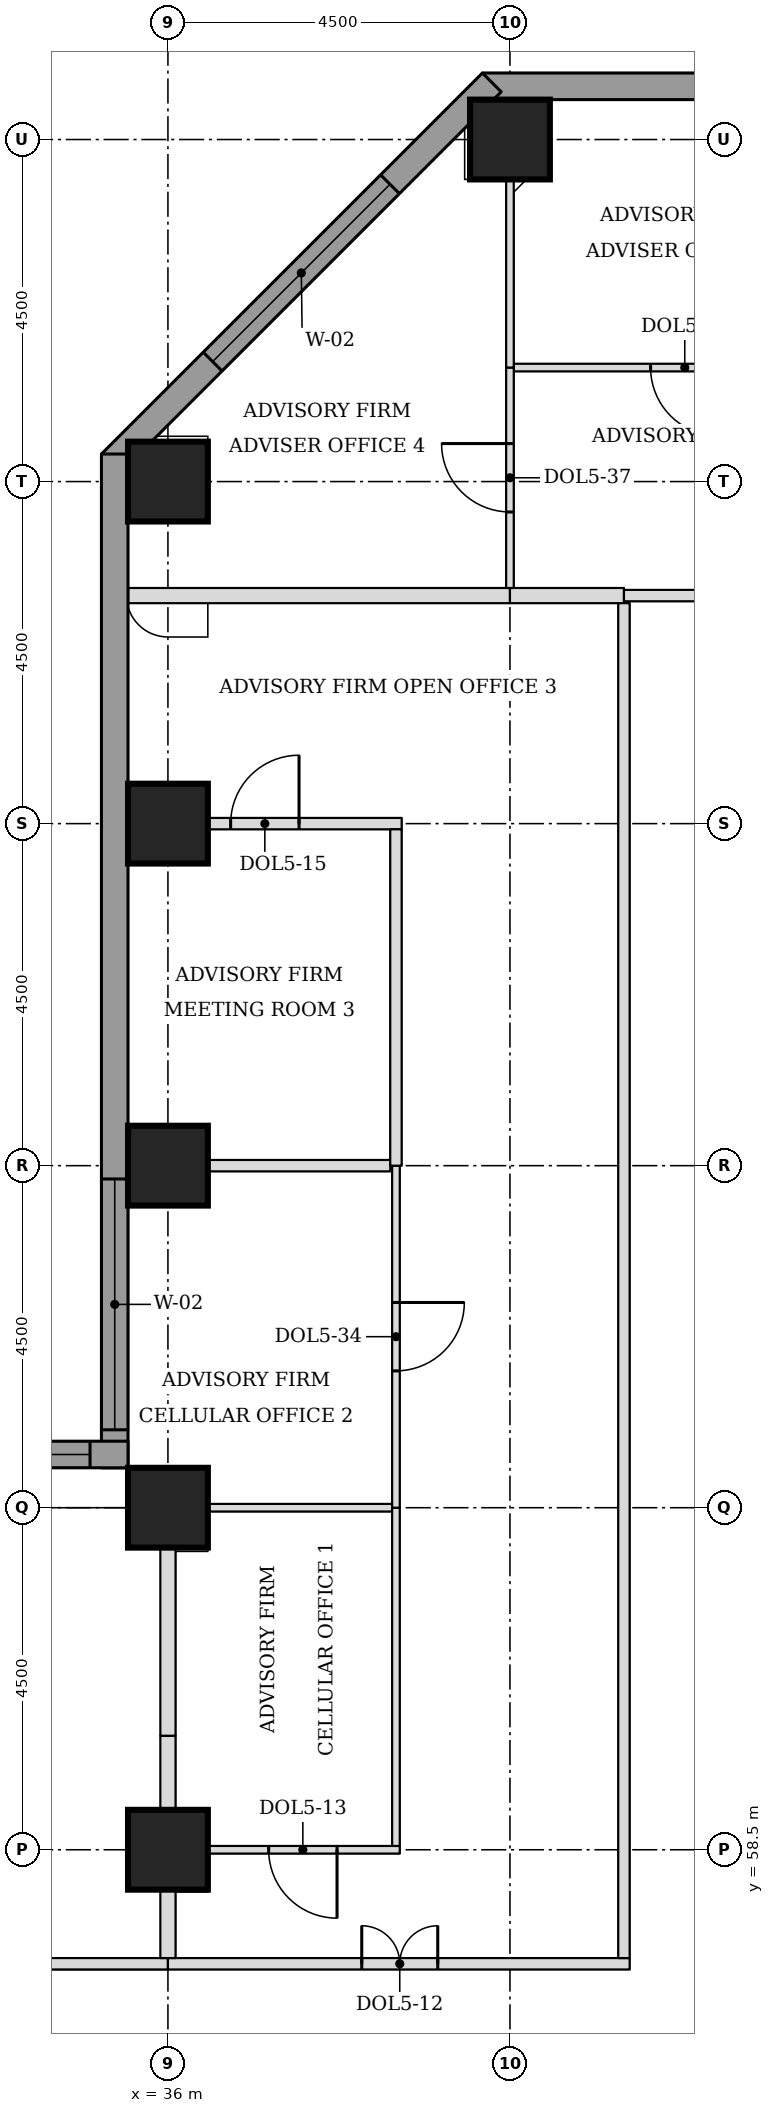
"""IFC4 building model, lengths in metres.
Left out: names, types, materials, properties, quantities, classifications, styles, units other than length and angle.
Written with IfcOpenShell. Run it as: python <this file> out.ifc"""

import sys

from ifc_helpers import new_model, si_unit, direction, frame, frame_2d, origin, origin_2d, place, context, subcontext, project, spatial, rectangle, extrude, element, fill, save


model = new_model("IFC4")
c1 = context("Model", 3, precision=1e-05, world=origin(), true_north=direction((0.0, 1.0)))
c2 = subcontext(c1, "Body", "Model", "MODEL_VIEW")
j1 = project(units=[si_unit("LENGTHUNIT", "METRE"), si_unit("PLANEANGLEUNIT", "RADIAN")], contexts=[c1])
p1 = place(None, origin())
s1 = spatial("IfcSite", under=j1, at=p1, CompositionType="ELEMENT")
p2 = place(p1, origin())
s2 = spatial("IfcBuilding", under=s1, at=p2, CompositionType="ELEMENT")
p3 = place(p2, frame((0.0, 0.0, 108.5)))
s3 = spatial("IfcBuildingStorey", under=s2, at=p3, CompositionType="ELEMENT", Elevation=108.5)
for number, where, z_axis, x_axis in (
    (1, (36.0, 58.5, 0.0), (0.0, 0.0, 1.0), (1.0, 0.0, 0.0)),
    (2, (36.0, 63.0, 0.0), (0.0, 0.0, 1.0), (1.0, 0.0, 0.0)),
    (3, (36.0, 67.5, 0.0), (0.0, 0.0, 1.0), (1.0, 0.0, 0.0)),
    (4, (36.0, 72.0, 0.0), (0.0, 0.0, 1.0), (1.0, 0.0, 0.0)),
    (5, (36.0, 76.5, 0.0), (0.0, 0.0, 1.0), (1.0, 0.0, 0.0)),
    (6, (40.5, 81.0, 0.0), (0.0, 0.0, 1.0), (1.0, 0.0, 0.0)),
):
    element("IfcColumn", number, at=place(p3, frame(where, z_axis=z_axis, x_axis=x_axis)), inside=s3, PredefinedType="COLUMN", context=c2, shape_type="SweptSolid", body=[
        extrude(rectangle(XDim=1.05, YDim=1.05, at=origin_2d()), origin(), (0.0, 0.0, 1.0), 3.7),
    ])
p4 = place(p3, frame((72.362, 81.7, 0.0), z_axis=(0.0, 0.0, 1.0), x_axis=(-1.0, 0.0, 0.0)))
e7 = element("IfcWall", 7, at=p4, inside=s3, PredefinedType="STANDARD", context=c2, shape_type="SweptSolid", body=[
    extrude(rectangle(XDim=32.225, YDim=0.35, at=frame_2d((16.112, 0.0))), origin(), (0.0, 0.0, 1.0), 3.525),
])
p5 = place(p4, frame((5.462, 0.0, 0.9)))
e8 = element("IfcOpeningElement", 8, at=p5, cuts=e7, PredefinedType="OPENING", context=c2, shape_type="SweptSolid", body=[
    extrude(rectangle(XDim=3.3, YDim=1.9, at=frame_2d((1.65, 0.95))), frame((0.0, 0.185, 0.0), z_axis=(0.0, -1.0, 0.0), x_axis=(1.0, 0.0, 0.0)), (0.0, 0.0, 1.0), 0.37),
])
p6 = place(p4, frame((9.962, 0.0, 0.9)))
e9 = element("IfcOpeningElement", 9, at=p6, cuts=e7, PredefinedType="OPENING", context=c2, shape_type="SweptSolid", body=[
    extrude(rectangle(XDim=3.3, YDim=1.9, at=frame_2d((1.65, 0.95))), frame((0.0, 0.185, 0.0), z_axis=(0.0, -1.0, 0.0), x_axis=(1.0, 0.0, 0.0)), (0.0, 0.0, 1.0), 0.37),
])
p7 = place(p4, frame((14.462, 0.0, 0.9)))
e10 = element("IfcOpeningElement", 10, at=p7, cuts=e7, PredefinedType="OPENING", context=c2, shape_type="SweptSolid", body=[
    extrude(rectangle(XDim=3.3, YDim=1.9, at=frame_2d((1.65, 0.95))), frame((0.0, 0.185, 0.0), z_axis=(0.0, -1.0, 0.0), x_axis=(1.0, 0.0, 0.0)), (0.0, 0.0, 1.0), 0.37),
])
p8 = place(p4, frame((18.962, 0.0, 0.9)))
e11 = element("IfcOpeningElement", 11, at=p8, cuts=e7, PredefinedType="OPENING", context=c2, shape_type="SweptSolid", body=[
    extrude(rectangle(XDim=3.3, YDim=1.9, at=frame_2d((1.65, 0.95))), frame((0.0, 0.185, 0.0), z_axis=(0.0, -1.0, 0.0), x_axis=(1.0, 0.0, 0.0)), (0.0, 0.0, 1.0), 0.37),
])
p9 = place(p4, frame((23.462, 0.0, 0.9)))
e12 = element("IfcOpeningElement", 12, at=p9, cuts=e7, PredefinedType="OPENING", context=c2, shape_type="SweptSolid", body=[
    extrude(rectangle(XDim=3.3, YDim=1.9, at=frame_2d((1.65, 0.95))), frame((0.0, 0.185, 0.0), z_axis=(0.0, -1.0, 0.0), x_axis=(1.0, 0.0, 0.0)), (0.0, 0.0, 1.0), 0.37),
])
p10 = place(p3, frame((40.261, 81.751, 0.0), z_axis=(0.0, 0.0, 1.0), x_axis=(-0.707106781187, -0.707106781187, 0.0)))
e13 = element("IfcWall", 13, at=p10, inside=s3, PredefinedType="STANDARD", context=c2, shape_type="SweptSolid", body=[
    extrude(rectangle(XDim=7.089, YDim=0.35, at=frame_2d((3.544, 0.0))), origin(), (0.0, 0.0, 1.0), 3.525),
])
p11 = place(p10, frame((1.894, 0.0, 0.9)))
e14 = element("IfcOpeningElement", 14, at=p11, cuts=e13, PredefinedType="OPENING", context=c2, shape_type="SweptSolid", body=[
    extrude(rectangle(XDim=3.3, YDim=1.9, at=frame_2d((1.65, 0.95))), frame((0.0, 0.185, 0.0), z_axis=(0.0, -1.0, 0.0), x_axis=(1.0, 0.0, 0.0)), (0.0, 0.0, 1.0), 0.37),
])
p12 = place(p3, frame((35.3, 76.862, 0.0), z_axis=(0.0, 0.0, 1.0), x_axis=(0.0, -1.0, 0.0)))
e15 = element("IfcWall", 15, at=p12, inside=s3, PredefinedType="STANDARD", context=c2, shape_type="SweptSolid", body=[
    extrude(rectangle(XDim=13.337, YDim=0.35, at=frame_2d((6.669, 0.0))), origin(), (0.0, 0.0, 1.0), 3.525),
])
p13 = place(p12, frame((9.537, 0.0, 0.9)))
e16 = element("IfcOpeningElement", 16, at=p13, cuts=e15, PredefinedType="OPENING", context=c2, shape_type="SweptSolid", body=[
    extrude(rectangle(XDim=3.3, YDim=1.9, at=frame_2d((1.65, 0.95))), frame((0.0, 0.185, 0.0), z_axis=(0.0, -1.0, 0.0), x_axis=(1.0, 0.0, 0.0)), (0.0, 0.0, 1.0), 0.37),
])
p14 = place(p3, frame((35.475, 63.7, 0.0), z_axis=(0.0, 0.0, 1.0), x_axis=(-1.0, 0.0, 0.0)))
e17 = element("IfcWall", 17, at=p14, inside=s3, PredefinedType="STANDARD", context=c2, shape_type="SweptSolid", body=[
    extrude(rectangle(XDim=17.837, YDim=0.35, at=frame_2d((8.919, 0.0))), origin(), (0.0, 0.0, 1.0), 3.525),
])
p15 = place(p14, frame((0.5, 0.0, 0.9)))
e18 = element("IfcOpeningElement", 18, at=p15, cuts=e17, PredefinedType="OPENING", context=c2, shape_type="SweptSolid", body=[
    extrude(rectangle(XDim=3.3, YDim=1.9, at=frame_2d((1.65, 0.95))), frame((0.0, 0.185, 0.0), z_axis=(0.0, -1.0, 0.0), x_axis=(1.0, 0.0, 0.0)), (0.0, 0.0, 1.0), 0.37),
])
p16 = place(p14, frame((9.075, 0.0, 0.9)))
e19 = element("IfcOpeningElement", 19, at=p16, cuts=e17, PredefinedType="OPENING", context=c2, shape_type="SweptSolid", body=[
    extrude(rectangle(XDim=3.3, YDim=1.9, at=frame_2d((1.65, 0.95))), frame((0.0, 0.185, 0.0), z_axis=(0.0, -1.0, 0.0), x_axis=(1.0, 0.0, 0.0)), (0.0, 0.0, 1.0), 0.37),
])
p17 = place(p3, frame((29.38, 57.0, 0.0), z_axis=(0.0, 0.0, 1.0), x_axis=(1.0, 0.0, 0.0)))
e20 = element("IfcWall", 20, at=p17, inside=s3, PredefinedType="PARTITIONING", context=c2, shape_type="SweptSolid", body=[
    extrude(rectangle(XDim=6.62, YDim=0.15, at=frame_2d((3.31, 0.0))), origin(), (0.0, 0.0, 1.0), 3.55),
])
p18 = place(p17, frame((2.88, 0.0, 0.0)))
e21 = element("IfcOpeningElement", 21, at=p18, cuts=e20, PredefinedType="OPENING", context=c2, shape_type="SweptSolid", body=[
    extrude(rectangle(XDim=1.0, YDim=2.1, at=frame_2d((0.5, 1.05))), frame((0.0, 0.085, 0.0), z_axis=(0.0, -1.0, 0.0), x_axis=(1.0, 0.0, 0.0)), (0.0, 0.0, 1.0), 0.17),
])
p19 = place(p3, frame((36.0, 57.0, 0.0), z_axis=(0.0, 0.0, 1.0), x_axis=(1.0, 0.0, 0.0)))
e22 = element("IfcWall", 22, at=p19, inside=s3, PredefinedType="PARTITIONING", context=c2, shape_type="SweptSolid", body=[
    extrude(rectangle(XDim=6.075, YDim=0.15, at=frame_2d((3.038, 0.0))), origin(), (0.0, 0.0, 1.0), 3.55),
])
p20 = place(p19, frame((2.55, 0.0, 0.0)))
e23 = element("IfcOpeningElement", 23, at=p20, cuts=e22, PredefinedType="OPENING", context=c2, shape_type="SweptSolid", body=[
    extrude(rectangle(XDim=1.0, YDim=2.1, at=frame_2d((0.5, 1.05))), frame((0.0, 0.085, 0.0), z_axis=(0.0, -1.0, 0.0), x_axis=(1.0, 0.0, 0.0)), (0.0, 0.0, 1.0), 0.17),
])
p21 = place(p3, frame((36.525, 58.5, 0.0), z_axis=(0.0, 0.0, 1.0), x_axis=(1.0, 0.0, 0.0)))
e24 = element("IfcWall", 24, at=p21, inside=s3, PredefinedType="PARTITIONING", context=c2, shape_type="SweptSolid", body=[
    extrude(rectangle(XDim=2.525, YDim=0.1, at=frame_2d((1.263, 0.0))), origin(), (0.0, 0.0, 1.0), 3.55),
])
p22 = place(p21, frame((0.8, 0.0, 0.0)))
e25 = element("IfcOpeningElement", 25, at=p22, cuts=e24, PredefinedType="OPENING", context=c2, shape_type="SweptSolid", body=[
    extrude(rectangle(XDim=0.9, YDim=2.1, at=frame_2d((0.45, 1.05))), frame((0.0, 0.06, 0.0), z_axis=(0.0, -1.0, 0.0), x_axis=(1.0, 0.0, 0.0)), (0.0, 0.0, 1.0), 0.12),
])
p23 = place(p3, frame((36.525, 63.0, 0.0), z_axis=(0.0, 0.0, 1.0), x_axis=(1.0, 0.0, 0.0)))
e26 = element("IfcWall", 26, at=p23, inside=s3, PredefinedType="PARTITIONING", context=c2, shape_type="SweptSolid", body=[
    extrude(rectangle(XDim=2.425, YDim=0.1, at=frame_2d((1.212, 0.0))), origin(), (0.0, 0.0, 1.0), 3.55),
])
p24 = place(p3, frame((35.475, 67.5, 0.0), z_axis=(0.0, 0.0, 1.0), x_axis=(1.0, 0.0, 0.0)))
e27 = element("IfcWall", 27, at=p24, inside=s3, PredefinedType="PARTITIONING", context=c2, shape_type="SweptSolid", body=[
    extrude(rectangle(XDim=3.45, YDim=0.15, at=frame_2d((1.725, 0.0))), origin(), (0.0, 0.0, 1.0), 3.55),
])
p25 = place(p3, frame((35.475, 72.0, 0.0), z_axis=(0.0, 0.0, 1.0), x_axis=(1.0, 0.0, 0.0)))
e28 = element("IfcWall", 28, at=p25, inside=s3, PredefinedType="PARTITIONING", context=c2, shape_type="SweptSolid", body=[
    extrude(rectangle(XDim=3.6, YDim=0.15, at=frame_2d((1.8, 0.0))), origin(), (0.0, 0.0, 1.0), 3.55),
])
p26 = place(p25, frame((1.35, 0.0, 0.0)))
e29 = element("IfcOpeningElement", 29, at=p26, cuts=e28, PredefinedType="OPENING", context=c2, shape_type="SweptSolid", body=[
    extrude(rectangle(XDim=0.9, YDim=2.1, at=frame_2d((0.45, 1.05))), frame((0.0, 0.085, 0.0), z_axis=(0.0, -1.0, 0.0), x_axis=(1.0, 0.0, 0.0)), (0.0, 0.0, 1.0), 0.17),
])
p27 = place(p3, frame((35.475, 75.0, 0.0), z_axis=(0.0, 0.0, 1.0), x_axis=(1.0, 0.0, 0.0)))
e30 = element("IfcWall", 30, at=p27, inside=s3, PredefinedType="PARTITIONING", context=c2, shape_type="SweptSolid", body=[
    extrude(rectangle(XDim=5.025, YDim=0.2, at=frame_2d((2.512, 0.0))), origin(), (0.0, 0.0, 1.0), 3.55),
])
p28 = place(p3, frame((40.5, 75.0, 0.0), z_axis=(0.0, 0.0, 1.0), x_axis=(1.0, 0.0, 0.0)))
e31 = element("IfcWall", 31, at=p28, inside=s3, PredefinedType="PARTITIONING", context=c2, shape_type="SweptSolid", body=[
    extrude(rectangle(XDim=1.5, YDim=0.2, at=frame_2d((0.75, 0.0))), origin(), (0.0, 0.0, 1.0), 3.55),
])
p29 = place(p3, frame((42.0, 75.0, 0.0), z_axis=(0.0, 0.0, 1.0), x_axis=(1.0, 0.0, 0.0)))
e32 = element("IfcWall", 32, at=p29, inside=s3, PredefinedType="PARTITIONING", context=c2, shape_type="SweptSolid", body=[
    extrude(rectangle(XDim=4.5, YDim=0.15, at=frame_2d((2.25, 0.0))), origin(), (0.0, 0.0, 1.0), 3.55),
])
p30 = place(p29, frame((1.75, 0.0, 0.0)))
e33 = element("IfcOpeningElement", 33, at=p30, cuts=e32, PredefinedType="OPENING", context=c2, shape_type="SweptSolid", body=[
    extrude(rectangle(XDim=1.0, YDim=2.1, at=frame_2d((0.5, 1.05))), frame((0.0, 0.085, 0.0), z_axis=(0.0, -1.0, 0.0), x_axis=(1.0, 0.0, 0.0)), (0.0, 0.0, 1.0), 0.17),
])
p31 = place(p3, frame((40.55, 78.0, 0.0), z_axis=(0.0, 0.0, 1.0), x_axis=(1.0, 0.0, 0.0)))
e34 = element("IfcWall", 34, at=p31, inside=s3, PredefinedType="PARTITIONING", context=c2, shape_type="SweptSolid", body=[
    extrude(rectangle(XDim=4.45, YDim=0.1, at=frame_2d((2.225, 0.0))), origin(), (0.0, 0.0, 1.0), 3.55),
])
p32 = place(p31, frame((1.8, 0.0, 0.0)))
e35 = element("IfcOpeningElement", 35, at=p32, cuts=e34, PredefinedType="OPENING", context=c2, shape_type="SweptSolid", body=[
    extrude(rectangle(XDim=0.9, YDim=2.1, at=frame_2d((0.45, 1.05))), frame((0.0, 0.06, 0.0), z_axis=(0.0, -1.0, 0.0), x_axis=(1.0, 0.0, 0.0)), (0.0, 0.0, 1.0), 0.12),
])
p33 = place(p3, frame((36.0, 57.075, 0.0), z_axis=(0.0, 0.0, 1.0), x_axis=(0.0, 1.0, 0.0)))
e36 = element("IfcWall", 36, at=p33, inside=s3, PredefinedType="PARTITIONING", context=c2, shape_type="SweptSolid", body=[
    extrude(rectangle(XDim=0.9, YDim=0.2, at=frame_2d((0.45, 0.0))), origin(), (0.0, 0.0, 1.0), 2.8),
])
p34 = place(p3, frame((42.0, 57.075, 0.0), z_axis=(0.0, 0.0, 1.0), x_axis=(0.0, 1.0, 0.0)))
e37 = element("IfcWall", 37, at=p34, inside=s3, PredefinedType="PARTITIONING", context=c2, shape_type="SweptSolid", body=[
    extrude(rectangle(XDim=17.825, YDim=0.15, at=frame_2d((8.913, 0.0))), origin(), (0.0, 0.0, 1.0), 3.55),
])
p35 = place(p3, frame((39.0, 58.55, 0.0), z_axis=(0.0, 0.0, 1.0), x_axis=(0.0, 1.0, 0.0)))
e38 = element("IfcWall", 38, at=p35, inside=s3, PredefinedType="PARTITIONING", context=c2, shape_type="SweptSolid", body=[
    extrude(rectangle(XDim=4.45, YDim=0.1, at=frame_2d((2.225, 0.0))), origin(), (0.0, 0.0, 1.0), 3.55),
])
p36 = place(p3, frame((36.0, 58.995, 0.0), z_axis=(0.0, 0.0, 1.0), x_axis=(0.0, 1.0, 0.0)))
e39 = element("IfcWall", 39, at=p36, inside=s3, PredefinedType="PARTITIONING", context=c2, shape_type="SweptSolid", body=[
    extrude(rectangle(XDim=1.005, YDim=0.2, at=frame_2d((0.502, 0.0))), origin(), (0.0, 0.0, 1.0), 2.8),
])
p37 = place(p3, frame((36.0, 60.0, 0.0), z_axis=(0.0, 0.0, 1.0), x_axis=(0.0, 1.0, 0.0)))
e40 = element("IfcWall", 40, at=p37, inside=s3, PredefinedType="PARTITIONING", context=c2, shape_type="SweptSolid", body=[
    extrude(rectangle(XDim=2.475, YDim=0.2, at=frame_2d((1.238, 0.0))), origin(), (0.0, 0.0, 1.0), 2.8),
])
p38 = place(p3, frame((39.0, 63.0, 0.0), z_axis=(0.0, 0.0, 1.0), x_axis=(0.0, 1.0, 0.0)))
e41 = element("IfcWall", 41, at=p38, inside=s3, PredefinedType="PARTITIONING", context=c2, shape_type="SweptSolid", body=[
    extrude(rectangle(XDim=4.5, YDim=0.1, at=frame_2d((2.25, 0.0))), origin(), (0.0, 0.0, 1.0), 3.55),
])
p39 = place(p38, frame((1.8, 0.0, 0.0)))
e42 = element("IfcOpeningElement", 42, at=p39, cuts=e41, PredefinedType="OPENING", context=c2, shape_type="SweptSolid", body=[
    extrude(rectangle(XDim=0.9, YDim=2.1, at=frame_2d((0.45, 1.05))), frame((0.0, 0.06, 0.0), z_axis=(0.0, -1.0, 0.0), x_axis=(1.0, 0.0, 0.0)), (0.0, 0.0, 1.0), 0.12),
])
p40 = place(p3, frame((39.0, 67.5, 0.0), z_axis=(0.0, 0.0, 1.0), x_axis=(0.0, 1.0, 0.0)))
e43 = element("IfcWall", 43, at=p40, inside=s3, PredefinedType="PARTITIONING", context=c2, shape_type="SweptSolid", body=[
    extrude(rectangle(XDim=4.425, YDim=0.15, at=frame_2d((2.212, 0.0))), origin(), (0.0, 0.0, 1.0), 3.55),
])
p41 = place(p3, frame((40.5, 75.1, 0.0), z_axis=(0.0, 0.0, 1.0), x_axis=(0.0, 1.0, 0.0)))
e44 = element("IfcWall", 44, at=p41, inside=s3, PredefinedType="PARTITIONING", context=c2, shape_type="SweptSolid", body=[
    extrude(rectangle(XDim=2.9, YDim=0.1, at=frame_2d((1.45, 0.0))), origin(), (0.0, 0.0, 1.0), 3.55),
])
p42 = place(p41, frame((1.0, 0.0, 0.0)))
e45 = element("IfcOpeningElement", 45, at=p42, cuts=e44, PredefinedType="OPENING", context=c2, shape_type="SweptSolid", body=[
    extrude(rectangle(XDim=0.9, YDim=2.1, at=frame_2d((0.45, 1.05))), frame((0.0, 0.06, 0.0), z_axis=(0.0, -1.0, 0.0), x_axis=(1.0, 0.0, 0.0)), (0.0, 0.0, 1.0), 0.12),
])
p43 = place(p3, frame((40.5, 78.0, 0.0), z_axis=(0.0, 0.0, 1.0), x_axis=(0.0, 1.0, 0.0)))
e46 = element("IfcWall", 46, at=p43, inside=s3, PredefinedType="PARTITIONING", context=c2, shape_type="SweptSolid", body=[
    extrude(rectangle(XDim=2.475, YDim=0.1, at=frame_2d((1.238, 0.0))), origin(), (0.0, 0.0, 1.0), 3.55),
])
p44 = place(p11, origin())
e47 = element("IfcWindow", 47, at=p44, inside=s3, PartitioningType="SINGLE_PANEL", PredefinedType="WINDOW", context=c2, shape_type="SweptSolid", body=[
    extrude(rectangle(XDim=3.3, YDim=1.9, at=frame_2d((1.65, 0.95))), frame((0.0, 0.085, 0.0), z_axis=(0.0, -1.0, 0.0), x_axis=(1.0, 0.0, 0.0)), (0.0, 0.0, 1.0), 0.06),
])
fill(e14, e47)
p45 = place(p13, origin())
e48 = element("IfcWindow", 48, at=p45, inside=s3, PartitioningType="SINGLE_PANEL", PredefinedType="WINDOW", context=c2, shape_type="SweptSolid", body=[
    extrude(rectangle(XDim=3.3, YDim=1.9, at=frame_2d((1.65, 0.95))), frame((0.0, 0.085, 0.0), z_axis=(0.0, -1.0, 0.0), x_axis=(1.0, 0.0, 0.0)), (0.0, 0.0, 1.0), 0.06),
])
fill(e16, e48)
p46 = place(p15, origin())
e49 = element("IfcWindow", 49, at=p46, inside=s3, PartitioningType="SINGLE_PANEL", PredefinedType="WINDOW", context=c2, shape_type="SweptSolid", body=[
    extrude(rectangle(XDim=3.3, YDim=1.9, at=frame_2d((1.65, 0.95))), frame((0.0, 0.085, 0.0), z_axis=(0.0, -1.0, 0.0), x_axis=(1.0, 0.0, 0.0)), (0.0, 0.0, 1.0), 0.06),
])
fill(e18, e49)
p47 = place(p42, origin())
e50 = element("IfcDoor", 50, at=p47, inside=s3, OperationType="SINGLE_SWING_RIGHT", PredefinedType="DOOR", context=c2, shape_type="SweptSolid", body=[
    extrude(rectangle(XDim=0.9, YDim=2.1, at=frame_2d((0.45, 1.05))), frame((0.0, 0.025, 0.0), z_axis=(0.0, -1.0, 0.0), x_axis=(1.0, 0.0, 0.0)), (0.0, 0.0, 1.0), 0.05),
])
fill(e45, e50)
p48 = place(p32, frame((0.9, 0.0, 0.0), z_axis=(0.0, 0.0, 1.0), x_axis=(-1.0, 0.0, 0.0)))
e51 = element("IfcDoor", 51, at=p48, inside=s3, OperationType="SINGLE_SWING_LEFT", PredefinedType="DOOR", context=c2, shape_type="SweptSolid", body=[
    extrude(rectangle(XDim=0.9, YDim=2.1, at=frame_2d((0.45, 1.05))), frame((0.0, 0.025, 0.0), z_axis=(0.0, -1.0, 0.0), x_axis=(1.0, 0.0, 0.0)), (0.0, 0.0, 1.0), 0.05),
])
fill(e35, e51)
p49 = place(p20, origin())
e52 = element("IfcDoor", 52, at=p49, inside=s3, OperationType="DOUBLE_DOOR_SINGLE_SWING", PredefinedType="DOOR", context=c2, shape_type="SweptSolid", body=[
    extrude(rectangle(XDim=1.0, YDim=2.1, at=frame_2d((0.5, 1.05))), frame((0.0, 0.025, 0.0), z_axis=(0.0, -1.0, 0.0), x_axis=(1.0, 0.0, 0.0)), (0.0, 0.0, 1.0), 0.05),
])
fill(e23, e52)
p50 = place(p22, frame((0.9, 0.0, 0.0), z_axis=(0.0, 0.0, 1.0), x_axis=(-1.0, 0.0, 0.0)))
e53 = element("IfcDoor", 53, at=p50, inside=s3, OperationType="SINGLE_SWING_LEFT", PredefinedType="DOOR", context=c2, shape_type="SweptSolid", body=[
    extrude(rectangle(XDim=0.9, YDim=2.1, at=frame_2d((0.45, 1.05))), frame((0.0, 0.025, 0.0), z_axis=(0.0, -1.0, 0.0), x_axis=(1.0, 0.0, 0.0)), (0.0, 0.0, 1.0), 0.05),
])
fill(e25, e53)
p51 = place(p39, frame((0.9, 0.0, 0.0), z_axis=(0.0, 0.0, 1.0), x_axis=(-1.0, 0.0, 0.0)))
e54 = element("IfcDoor", 54, at=p51, inside=s3, OperationType="SINGLE_SWING_LEFT", PredefinedType="DOOR", context=c2, shape_type="SweptSolid", body=[
    extrude(rectangle(XDim=0.9, YDim=2.1, at=frame_2d((0.45, 1.05))), frame((0.0, 0.025, 0.0), z_axis=(0.0, -1.0, 0.0), x_axis=(1.0, 0.0, 0.0)), (0.0, 0.0, 1.0), 0.05),
])
fill(e42, e54)
p52 = place(p26, origin())
e55 = element("IfcDoor", 55, at=p52, inside=s3, OperationType="SINGLE_SWING_RIGHT", PredefinedType="DOOR", context=c2, shape_type="SweptSolid", body=[
    extrude(rectangle(XDim=0.9, YDim=2.1, at=frame_2d((0.45, 1.05))), frame((0.0, 0.025, 0.0), z_axis=(0.0, -1.0, 0.0), x_axis=(1.0, 0.0, 0.0)), (0.0, 0.0, 1.0), 0.05),
])
fill(e29, e55)
save(model, sys.argv[1])
